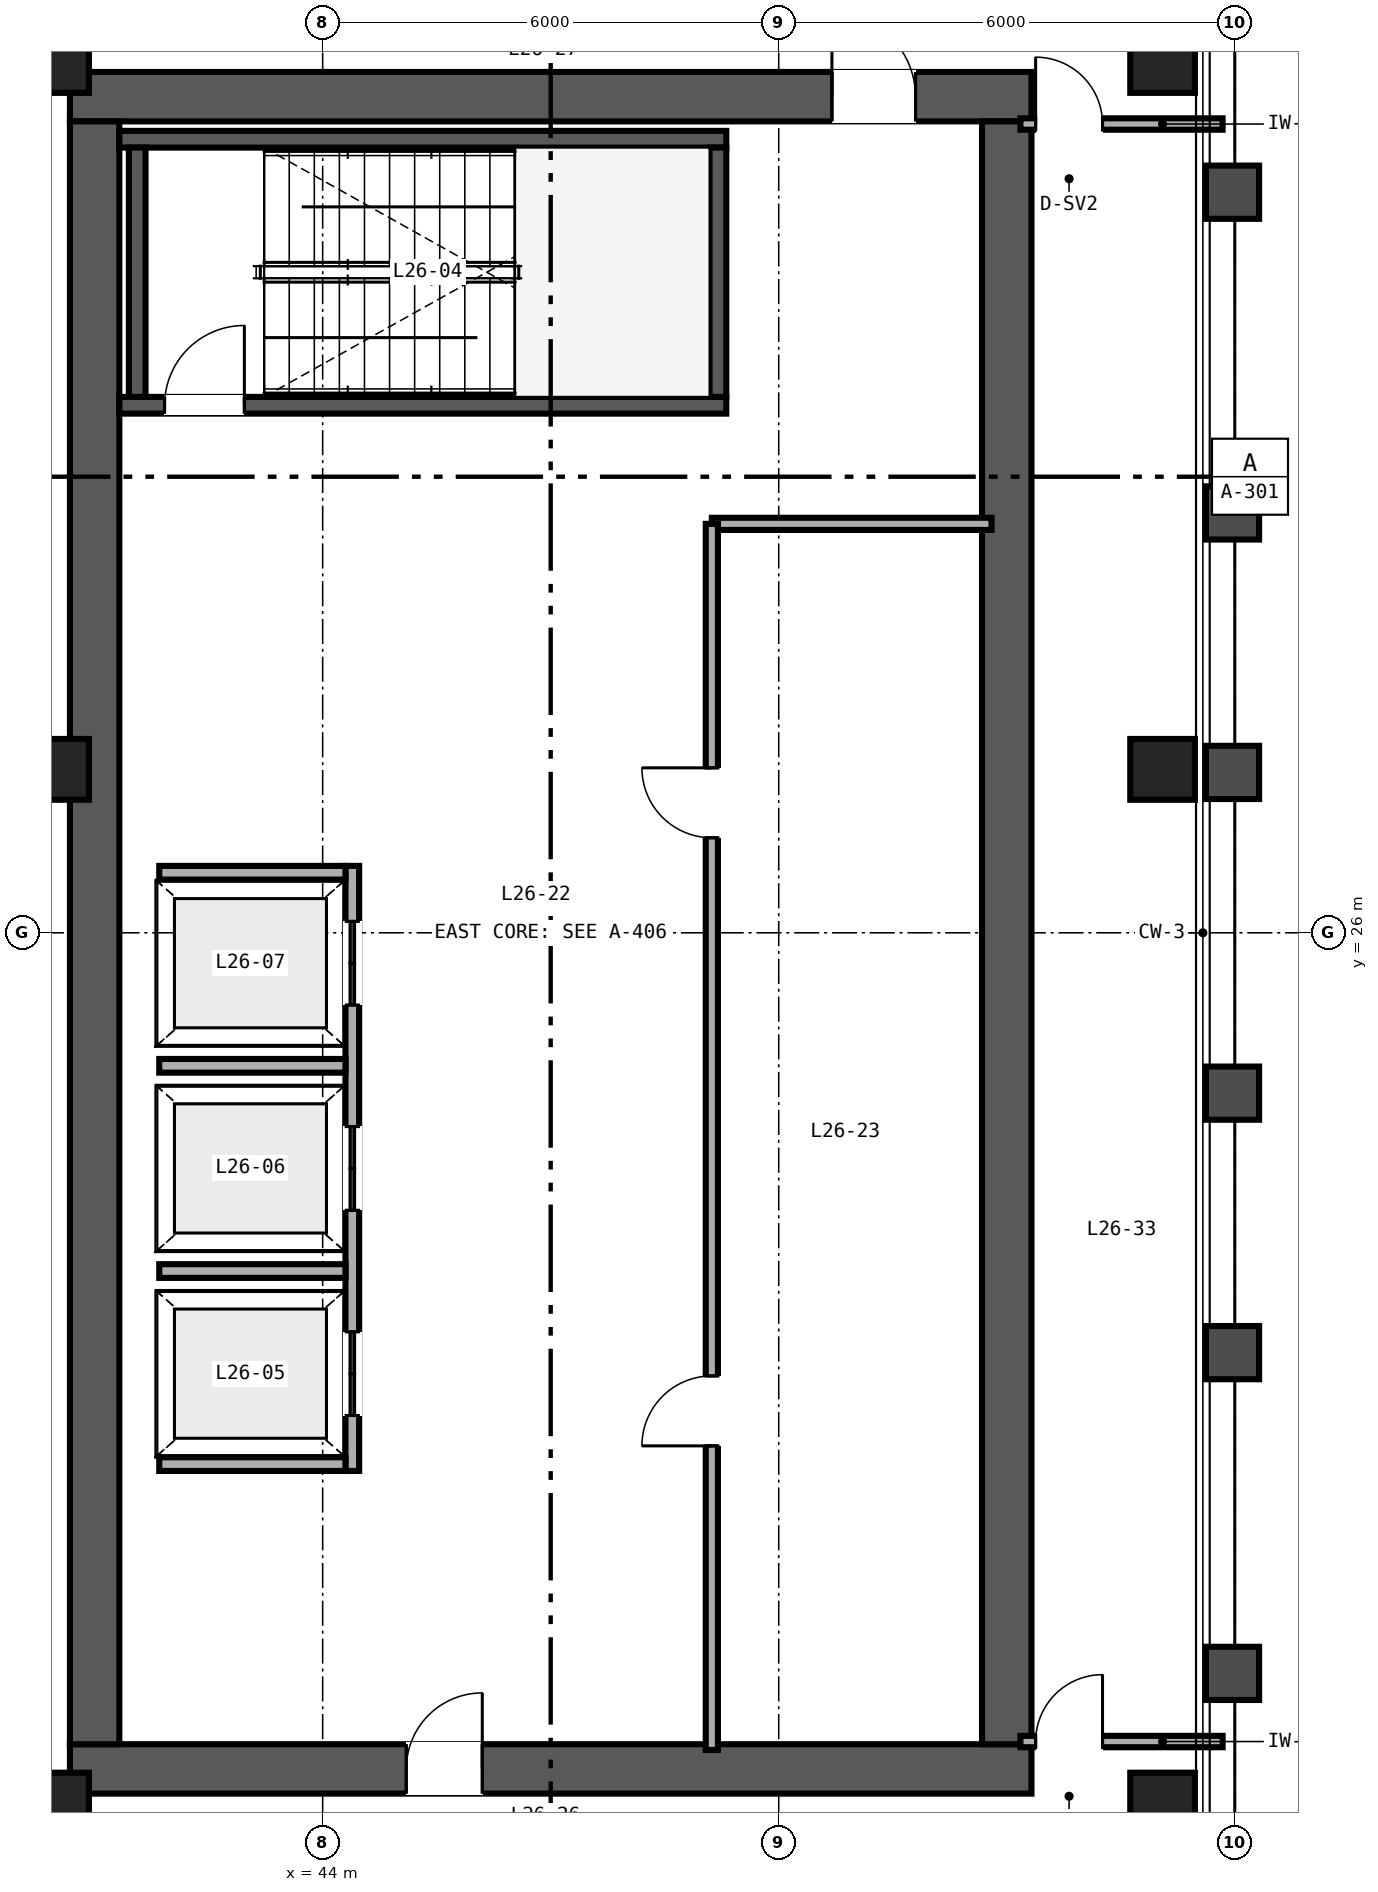
"""IFC4 building model, lengths in metres.
Left out: names, types, materials, properties, quantities, classifications, styles, units other than length and angle.
Written with IfcOpenShell. Run it as: python <this file> out.ifc"""

import sys

from ifc_helpers import new_model, si_unit, direction, frame, frame_2d, origin, origin_2d, place, context, subcontext, project, spatial, rectangle, hollow_rectangle, extrude, source, transform, mapped, element, fill, save


model = new_model("IFC4")
c1 = context("Model", 3, precision=1e-05, world=origin(), true_north=direction((0.0, 1.0)))
c2 = subcontext(c1, "Body", "Model", "MODEL_VIEW")
j1 = project(units=[si_unit("LENGTHUNIT", "METRE"), si_unit("PLANEANGLEUNIT", "RADIAN")], contexts=[c1])
p1 = place(None, origin())
s1 = spatial("IfcSite", under=j1, at=p1, CompositionType="ELEMENT")
p2 = place(p1, origin())
s2 = spatial("IfcBuilding", under=s1, at=p2, CompositionType="ELEMENT")
p3 = place(p2, frame((0.0, 0.0, 108.0)))
s3 = spatial("IfcBuildingStorey", under=s2, at=p3, CompositionType="ELEMENT", Elevation=108.0)
p4 = place(p3, frame((40.675, 15.0, 0.0), z_axis=(0.0, 0.0, 1.0), x_axis=(1.0, 0.0, 0.0)))
e1 = element("IfcWall", 1, at=p4, inside=s3, PredefinedType="SHEAR", context=c2, shape_type="SweptSolid", body=[
    extrude(rectangle(XDim=12.65, YDim=0.65, at=frame_2d((6.325, 0.0))), origin(), (0.0, 0.0, 1.0), 3.36),
])
p5 = place(p4, frame((4.425, 0.0, 0.0)))
e2 = element("IfcOpeningElement", 2, at=p5, cuts=e1, PredefinedType="OPENING", context=c2, shape_type="SweptSolid", body=[
    extrude(rectangle(XDim=1.0, YDim=2.15, at=frame_2d((0.5, 1.075))), frame((0.0, 0.335, 0.0), z_axis=(0.0, -1.0, 0.0), x_axis=(1.0, 0.0, 0.0)), (0.0, 0.0, 1.0), 0.67),
])
p6 = place(p3, frame((40.675, 37.0, 0.0), z_axis=(0.0, 0.0, 1.0), x_axis=(1.0, 0.0, 0.0)))
e3 = element("IfcWall", 3, at=p6, inside=s3, PredefinedType="SHEAR", context=c2, shape_type="SweptSolid", body=[
    extrude(rectangle(XDim=12.65, YDim=0.65, at=frame_2d((6.325, 0.0))), origin(), (0.0, 0.0, 1.0), 3.36),
])
p7 = place(p6, frame((10.025, 0.0, 0.0)))
e4 = element("IfcOpeningElement", 4, at=p7, cuts=e3, PredefinedType="OPENING", context=c2, shape_type="SweptSolid", body=[
    extrude(rectangle(XDim=1.1, YDim=2.15, at=frame_2d((0.55, 1.075))), frame((0.0, 0.335, 0.0), z_axis=(0.0, -1.0, 0.0), x_axis=(1.0, 0.0, 0.0)), (0.0, 0.0, 1.0), 0.67),
])
for number, where, z_axis, x_axis in (
    (5, (41.0, 15.325, 0.0), (0.0, 0.0, 1.0), (0.0, 1.0, 0.0)),
    (6, (53.0, 15.325, 0.0), (0.0, 0.0, 1.0), (0.0, 1.0, 0.0)),
):
    element("IfcWall", number, at=place(p3, frame(where, z_axis=z_axis, x_axis=x_axis)), inside=s3, PredefinedType="SHEAR", context=c2, shape_type="SweptSolid", body=[
        extrude(rectangle(XDim=21.35, YDim=0.65, at=frame_2d((10.675, 0.0))), origin(), (0.0, 0.0, 1.0), 3.36),
    ])
p8 = place(p3, frame((41.325, 32.94, 0.0), z_axis=(0.0, 0.0, 1.0), x_axis=(1.0, 0.0, 0.0)))
e7 = element("IfcWall", 7, at=p8, inside=s3, PredefinedType="SHEAR", context=c2, shape_type="SweptSolid", body=[
    extrude(rectangle(XDim=7.985, YDim=0.22, at=frame_2d((3.993, 0.0))), origin(), (0.0, 0.0, 1.0), 3.4),
])
p9 = place(p8, frame((0.595, 0.0, 0.0)))
e8 = element("IfcOpeningElement", 8, at=p9, cuts=e7, PredefinedType="OPENING", context=c2, shape_type="SweptSolid", body=[
    extrude(rectangle(XDim=1.05, YDim=2.15, at=frame_2d((0.525, 1.075))), frame((0.0, 0.12, 0.0), z_axis=(0.0, -1.0, 0.0), x_axis=(1.0, 0.0, 0.0)), (0.0, 0.0, 1.0), 0.24),
])
p10 = place(p3, frame((41.325, 36.44, 0.0), z_axis=(0.0, 0.0, 1.0), x_axis=(1.0, 0.0, 0.0)))
e9 = element("IfcWall", 9, at=p10, inside=s3, PredefinedType="SHEAR", context=c2, shape_type="SweptSolid", body=[
    extrude(rectangle(XDim=7.985, YDim=0.22, at=frame_2d((3.993, 0.0))), origin(), (0.0, 0.0, 1.0), 3.4),
])
for number, where, z_axis, x_axis in (
    (10, (41.56, 33.05, 0.0), (0.0, 0.0, 1.0), (0.0, 1.0, 0.0)),
    (11, (49.2, 33.05, 0.0), (0.0, 0.0, 1.0), (0.0, 1.0, 0.0)),
):
    element("IfcWall", number, at=place(p3, frame(where, z_axis=z_axis, x_axis=x_axis)), inside=s3, PredefinedType="SHEAR", context=c2, shape_type="SweptSolid", body=[
        extrude(rectangle(XDim=3.28, YDim=0.22, at=frame_2d((1.64, 0.0))), origin(), (0.0, 0.0, 1.0), 3.4),
    ])
m1 = source(origin(), c2, "Body", "SweptSolid", [
    extrude(hollow_rectangle(XDim=0.85, YDim=0.8, WallThickness=0.032, at=origin_2d()), origin(), (0.0, 0.0, 1.0), 3.36),
])
for number, where, z_axis, x_axis in (
    (12, (40.5, 14.55, 0.0), (0.0, 0.0, 1.0), (1.0, 0.0, 0.0)),
    (13, (55.05, 14.55, 0.0), (0.0, 0.0, 1.0), (1.0, 0.0, 0.0)),
    (14, (40.5, 28.15, 0.0), (0.0, 0.0, 1.0), (1.0, 0.0, 0.0)),
    (15, (55.05, 28.15, 0.0), (0.0, 0.0, 1.0), (1.0, 0.0, 0.0)),
    (16, (40.5, 37.45, 0.0), (0.0, 0.0, 1.0), (1.0, 0.0, 0.0)),
    (17, (55.05, 37.45, 0.0), (0.0, 0.0, 1.0), (1.0, 0.0, 0.0)),
):
    element("IfcColumn", number, at=place(p3, frame(where, z_axis=z_axis, x_axis=x_axis)), inside=s3, PredefinedType="COLUMN", context=c2, shape_type="MappedRepresentation", body=[
        mapped(m1, transform((0.0, 0.0, 0.0), scale=1.0)),
    ])
p11 = place(p3, frame((44.39, 18.92, 0.0), z_axis=(0.0, 0.0, 1.0), x_axis=(0.0, 1.0, 0.0)))
e18 = element("IfcWall", 18, at=p11, inside=s3, PredefinedType="SOLIDWALL", context=c2, shape_type="SweptSolid", body=[
    extrude(rectangle(XDim=7.96, YDim=0.18, at=frame_2d((3.98, 0.0))), origin(), (0.0, 0.0, 1.0), 3.36),
])
p12 = place(p11, frame((0.73, 0.0, 0.0)))
e19 = element("IfcOpeningElement", 19, at=p12, cuts=e18, PredefinedType="OPENING", context=c2, shape_type="SweptSolid", body=[
    extrude(rectangle(XDim=1.1, YDim=2.2, at=frame_2d((0.55, 1.1))), frame((0.0, 0.1, 0.0), z_axis=(0.0, -1.0, 0.0), x_axis=(1.0, 0.0, 0.0)), (0.0, 0.0, 1.0), 0.2),
])
p13 = place(p11, frame((3.43, 0.0, 0.0)))
e20 = element("IfcOpeningElement", 20, at=p13, cuts=e18, PredefinedType="OPENING", context=c2, shape_type="SweptSolid", body=[
    extrude(rectangle(XDim=1.1, YDim=2.2, at=frame_2d((0.55, 1.1))), frame((0.0, 0.1, 0.0), z_axis=(0.0, -1.0, 0.0), x_axis=(1.0, 0.0, 0.0)), (0.0, 0.0, 1.0), 0.2),
])
p14 = place(p11, frame((6.13, 0.0, 0.0)))
e21 = element("IfcOpeningElement", 21, at=p14, cuts=e18, PredefinedType="OPENING", context=c2, shape_type="SweptSolid", body=[
    extrude(rectangle(XDim=1.1, YDim=2.2, at=frame_2d((0.55, 1.1))), frame((0.0, 0.1, 0.0), z_axis=(0.0, -1.0, 0.0), x_axis=(1.0, 0.0, 0.0)), (0.0, 0.0, 1.0), 0.2),
])
for number, where, z_axis, x_axis in (
    (22, (41.85, 19.01, 0.0), (0.0, 0.0, 1.0), (1.0, 0.0, 0.0)),
    (23, (41.85, 26.79, 0.0), (0.0, 0.0, 1.0), (1.0, 0.0, 0.0)),
    (24, (41.85, 21.55, 0.0), (0.0, 0.0, 1.0), (1.0, 0.0, 0.0)),
    (25, (41.85, 24.25, 0.0), (0.0, 0.0, 1.0), (1.0, 0.0, 0.0)),
):
    element("IfcWall", number, at=place(p3, frame(where, z_axis=z_axis, x_axis=x_axis)), inside=s3, PredefinedType="SOLIDWALL", context=c2, shape_type="SweptSolid", body=[
        extrude(rectangle(XDim=2.45, YDim=0.18, at=frame_2d((1.225, 0.0))), origin(), (0.0, 0.0, 1.0), 3.36),
    ])
p15 = place(p3, frame((49.12, 31.38, 0.0), z_axis=(0.0, 0.0, 1.0), x_axis=(1.0, 0.0, 0.0)))
e26 = element("IfcWall", 26, at=p15, inside=s3, PredefinedType="PARTITIONING", context=c2, shape_type="SweptSolid", body=[
    extrude(rectangle(XDim=3.68, YDim=0.16, at=frame_2d((1.84, 0.0))), origin(), (0.0, 0.0, 1.0), 2.36),
])
p16 = place(p3, frame((49.12, 15.25, 0.0), z_axis=(0.0, 0.0, 1.0), x_axis=(0.0, 1.0, 0.0)))
e27 = element("IfcWall", 27, at=p16, inside=s3, PredefinedType="PARTITIONING", context=c2, shape_type="SweptSolid", body=[
    extrude(rectangle(XDim=16.13, YDim=0.16, at=frame_2d((8.065, 0.0))), origin(), (0.0, 0.0, 1.0), 2.36),
])
p17 = place(p16, frame((4.0, 0.0, 0.0)))
e28 = element("IfcOpeningElement", 28, at=p17, cuts=e27, PredefinedType="OPENING", context=c2, shape_type="SweptSolid", body=[
    extrude(rectangle(XDim=0.92, YDim=2.15, at=frame_2d((0.46, 1.075))), frame((0.0, 0.09, 0.0), z_axis=(0.0, -1.0, 0.0), x_axis=(1.0, 0.0, 0.0)), (0.0, 0.0, 1.0), 0.18),
])
p18 = place(p16, frame((12.0, 0.0, 0.0)))
e29 = element("IfcOpeningElement", 29, at=p18, cuts=e27, PredefinedType="OPENING", context=c2, shape_type="SweptSolid", body=[
    extrude(rectangle(XDim=0.92, YDim=2.15, at=frame_2d((0.46, 1.075))), frame((0.0, 0.09, 0.0), z_axis=(0.0, -1.0, 0.0), x_axis=(1.0, 0.0, 0.0)), (0.0, 0.0, 1.0), 0.18),
])
p19 = place(p3, frame((53.18, 15.36, 0.0), z_axis=(0.0, 0.0, 1.0), x_axis=(1.0, 0.0, 0.0)))
e30 = element("IfcWall", 30, at=p19, inside=s3, PredefinedType="PARTITIONING", context=c2, shape_type="SweptSolid", body=[
    extrude(rectangle(XDim=2.66, YDim=0.15, at=frame_2d((1.33, 0.0))), origin(), (0.0, 0.0, 1.0), 2.581),
])
p20 = place(p19, frame((0.2, 0.0, 0.0)))
e31 = element("IfcOpeningElement", 31, at=p20, cuts=e30, PredefinedType="OPENING", context=c2, shape_type="SweptSolid", body=[
    extrude(rectangle(XDim=0.88, YDim=2.15, at=frame_2d((0.44, 1.075))), frame((0.0, 0.085, 0.0), z_axis=(0.0, -1.0, 0.0), x_axis=(1.0, 0.0, 0.0)), (0.0, 0.0, 1.0), 0.17),
])
p21 = place(p3, frame((53.18, 36.64, 0.0), z_axis=(0.0, 0.0, 1.0), x_axis=(1.0, 0.0, 0.0)))
e32 = element("IfcWall", 32, at=p21, inside=s3, PredefinedType="PARTITIONING", context=c2, shape_type="SweptSolid", body=[
    extrude(rectangle(XDim=2.66, YDim=0.15, at=frame_2d((1.33, 0.0))), origin(), (0.0, 0.0, 1.0), 2.743),
])
p22 = place(p21, frame((0.2, 0.0, 0.0)))
e33 = element("IfcOpeningElement", 33, at=p22, cuts=e32, PredefinedType="OPENING", context=c2, shape_type="SweptSolid", body=[
    extrude(rectangle(XDim=0.88, YDim=2.15, at=frame_2d((0.44, 1.075))), frame((0.0, 0.085, 0.0), z_axis=(0.0, -1.0, 0.0), x_axis=(1.0, 0.0, 0.0)), (0.0, 0.0, 1.0), 0.17),
])
m2 = source(origin(), c2, "Body", "SweptSolid", [
    extrude(rectangle(XDim=1.05, YDim=2.15, at=frame_2d((0.525, 1.075))), frame((0.0, 0.025, 0.0), z_axis=(0.0, -1.0, 0.0), x_axis=(1.0, 0.0, 0.0)), (0.0, 0.0, 1.0), 0.05),
])
p23 = place(p9, origin())
e34 = element("IfcDoor", 34, at=p23, inside=s3, OperationType="SINGLE_SWING_RIGHT", PredefinedType="DOOR", context=c2, shape_type="MappedRepresentation", body=[
    mapped(m2, transform((0.0, 0.0, 0.0), scale=1.0)),
])
fill(e8, e34)
m3 = source(origin(), c2, "Body", "SweptSolid", [
    extrude(rectangle(XDim=1.1, YDim=2.2, at=frame_2d((0.55, 1.1))), frame((0.0, 0.025, 0.0), z_axis=(0.0, -1.0, 0.0), x_axis=(1.0, 0.0, 0.0)), (0.0, 0.0, 1.0), 0.05),
])
p24 = place(p12, origin())
e35 = element("IfcDoor", 35, at=p24, inside=s3, OperationType="DOUBLE_DOOR_SLIDING", PredefinedType="DOOR", context=c2, shape_type="MappedRepresentation", body=[
    mapped(m3, transform((0.0, 0.0, 0.0), scale=1.0)),
])
fill(e19, e35)
p25 = place(p13, origin())
e36 = element("IfcDoor", 36, at=p25, inside=s3, OperationType="DOUBLE_DOOR_SLIDING", PredefinedType="DOOR", context=c2, shape_type="MappedRepresentation", body=[
    mapped(m3, transform((0.0, 0.0, 0.0), scale=1.0)),
])
fill(e20, e36)
p26 = place(p14, origin())
e37 = element("IfcDoor", 37, at=p26, inside=s3, OperationType="DOUBLE_DOOR_SLIDING", PredefinedType="DOOR", context=c2, shape_type="MappedRepresentation", body=[
    mapped(m3, transform((0.0, 0.0, 0.0), scale=1.0)),
])
fill(e21, e37)
m4 = source(origin(), c2, "Body", "SweptSolid", [
    extrude(rectangle(XDim=1.0, YDim=2.15, at=frame_2d((0.5, 1.075))), frame((0.0, 0.025, 0.0), z_axis=(0.0, -1.0, 0.0), x_axis=(1.0, 0.0, 0.0)), (0.0, 0.0, 1.0), 0.05),
])
p27 = place(p5, origin())
e38 = element("IfcDoor", 38, at=p27, inside=s3, OperationType="SINGLE_SWING_RIGHT", PredefinedType="DOOR", context=c2, shape_type="MappedRepresentation", body=[
    mapped(m4, transform((0.0, 0.0, 0.0), scale=1.0)),
])
fill(e2, e38)
m5 = source(origin(), c2, "Body", "SweptSolid", [
    extrude(rectangle(XDim=1.1, YDim=2.15, at=frame_2d((0.55, 1.075))), frame((0.0, 0.025, 0.0), z_axis=(0.0, -1.0, 0.0), x_axis=(1.0, 0.0, 0.0)), (0.0, 0.0, 1.0), 0.05),
])
p28 = place(p7, origin())
e39 = element("IfcDoor", 39, at=p28, inside=s3, OperationType="SINGLE_SWING_LEFT", PredefinedType="DOOR", context=c2, shape_type="MappedRepresentation", body=[
    mapped(m5, transform((0.0, 0.0, 0.0), scale=1.0)),
])
fill(e4, e39)
m6 = source(origin(), c2, "Body", "SweptSolid", [
    extrude(rectangle(XDim=0.92, YDim=2.15, at=frame_2d((0.46, 1.075))), frame((0.0, 0.025, 0.0), z_axis=(0.0, -1.0, 0.0), x_axis=(1.0, 0.0, 0.0)), (0.0, 0.0, 1.0), 0.05),
])
p29 = place(p17, origin())
e40 = element("IfcDoor", 40, at=p29, inside=s3, OperationType="SINGLE_SWING_LEFT", PredefinedType="DOOR", context=c2, shape_type="MappedRepresentation", body=[
    mapped(m6, transform((0.0, 0.0, 0.0), scale=1.0)),
])
fill(e28, e40)
p30 = place(p18, origin())
e41 = element("IfcDoor", 41, at=p30, inside=s3, OperationType="SINGLE_SWING_RIGHT", PredefinedType="DOOR", context=c2, shape_type="MappedRepresentation", body=[
    mapped(m6, transform((0.0, 0.0, 0.0), scale=1.0)),
])
fill(e29, e41)
m7 = source(origin(), c2, "Body", "SweptSolid", [
    extrude(rectangle(XDim=0.88, YDim=2.15, at=frame_2d((0.44, 1.075))), frame((0.0, 0.025, 0.0), z_axis=(0.0, -1.0, 0.0), x_axis=(1.0, 0.0, 0.0)), (0.0, 0.0, 1.0), 0.05),
])
p31 = place(p20, origin())
e42 = element("IfcDoor", 42, at=p31, inside=s3, OperationType="SINGLE_SWING_RIGHT", PredefinedType="DOOR", context=c2, shape_type="MappedRepresentation", body=[
    mapped(m7, transform((0.0, 0.0, 0.0), scale=1.0)),
])
fill(e31, e42)
p32 = place(p22, origin())
e43 = element("IfcDoor", 43, at=p32, inside=s3, OperationType="SINGLE_SWING_LEFT", PredefinedType="DOOR", context=c2, shape_type="MappedRepresentation", body=[
    mapped(m7, transform((0.0, 0.0, 0.0), scale=1.0)),
])
fill(e33, e43)
save(model, sys.argv[1])
